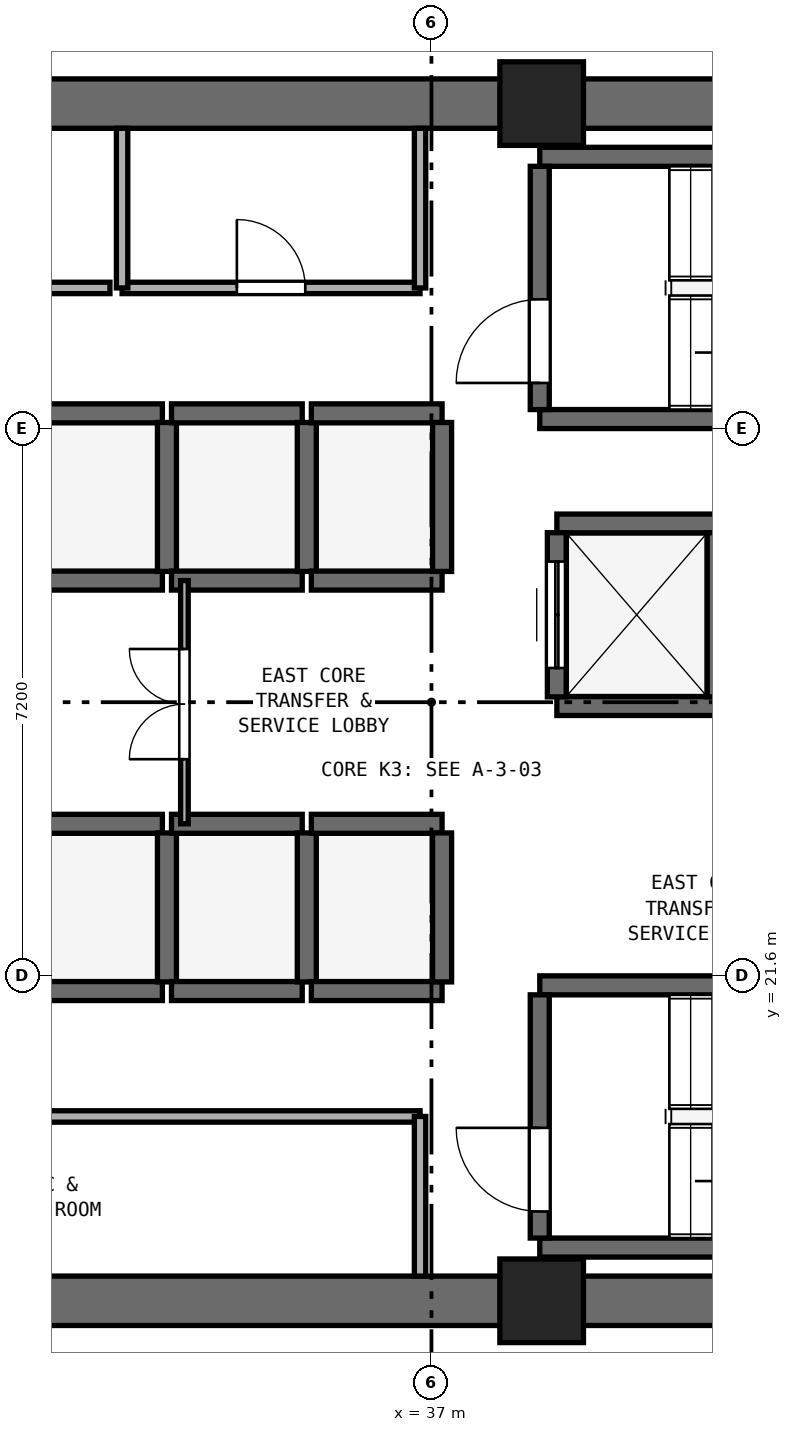
"""IFC4 building model, lengths in metres.
Left out: names, types, materials, properties, quantities, classifications, styles, units other than length and angle.
Written with IfcOpenShell. Run it as: python <this file> out.ifc"""

import sys

from ifc_helpers import new_model, si_unit, direction, frame, frame_2d, origin, origin_2d, place, context, subcontext, project, spatial, rectangle, extrude, element, fill, save


model = new_model("IFC4")
c1 = context("Model", 3, precision=1e-05, world=origin(), true_north=direction((0.0, 1.0)))
c2 = subcontext(c1, "Body", "Model", "MODEL_VIEW")
j1 = project(units=[si_unit("LENGTHUNIT", "METRE"), si_unit("PLANEANGLEUNIT", "RADIAN")], contexts=[c1])
p1 = place(None, origin())
s1 = spatial("IfcSite", under=j1, at=p1, CompositionType="ELEMENT")
p2 = place(p1, origin())
s2 = spatial("IfcBuilding", under=s1, at=p2, CompositionType="ELEMENT")
p3 = place(p2, frame((0.0, 0.0, 104.8)))
s3 = spatial("IfcBuildingStorey", under=s2, at=p3, CompositionType="ELEMENT", Elevation=104.8)
for number, where, z_axis, x_axis in (
    (1, (25.4, 17.325, 0.0), (0.0, 0.0, 1.0), (1.0, 0.0, 0.0)),
    (2, (25.4, 33.075, 0.0), (0.0, 0.0, 1.0), (1.0, 0.0, 0.0)),
):
    element("IfcWall", number, at=place(p3, frame(where, z_axis=z_axis, x_axis=x_axis)), inside=s3, PredefinedType="SHEAR", context=c2, shape_type="SweptSolid", body=[
        extrude(rectangle(XDim=23.2, YDim=0.65, at=frame_2d((11.6, 0.0))), origin(), (0.0, 0.0, 1.0), 3.525),
    ])
for number, where, z_axis, x_axis in (
    (3, (38.45, 17.325, 0.0), (0.0, 0.0, 1.0), (1.0, 0.0, 0.0)),
    (4, (38.45, 33.075, 0.0), (0.0, 0.0, 1.0), (1.0, 0.0, 0.0)),
):
    element("IfcColumn", number, at=place(p3, frame(where, z_axis=z_axis, x_axis=x_axis)), inside=s3, PredefinedType="PILASTER", context=c2, shape_type="SweptSolid", body=[
        extrude(rectangle(XDim=1.1, YDim=1.1, at=origin_2d()), origin(), (0.0, 0.0, 1.0), 3.8),
    ])
for number, where, z_axis, x_axis in (
    (5, (38.425, 28.925, 0.0), (0.0, 0.0, 1.0), (1.0, 0.0, 0.0)),
    (6, (38.425, 32.375, 0.0), (0.0, 0.0, 1.0), (1.0, 0.0, 0.0)),
):
    element("IfcWall", number, at=place(p3, frame(where, z_axis=z_axis, x_axis=x_axis)), inside=s3, PredefinedType="SHEAR", context=c2, shape_type="SweptSolid", body=[
        extrude(rectangle(XDim=7.3, YDim=0.25, at=frame_2d((3.65, 0.0))), origin(), (0.0, 0.0, 1.0), 3.525),
    ])
p4 = place(p3, frame((38.425, 29.05, 0.0), z_axis=(0.0, 0.0, 1.0), x_axis=(0.0, 1.0, 0.0)))
e7 = element("IfcWall", 7, at=p4, inside=s3, PredefinedType="SHEAR", context=c2, shape_type="SweptSolid", body=[
    extrude(rectangle(XDim=3.2, YDim=0.25, at=frame_2d((1.6, 0.0))), origin(), (0.0, 0.0, 1.0), 3.525),
])
p5 = place(p4, frame((0.35, 0.0, 0.0)))
e8 = element("IfcOpeningElement", 8, at=p5, cuts=e7, PredefinedType="OPENING", context=c2, shape_type="SweptSolid", body=[
    extrude(rectangle(XDim=1.1, YDim=2.15, at=frame_2d((0.55, 1.075))), frame((0.0, 0.135, 0.0), z_axis=(0.0, -1.0, 0.0), x_axis=(1.0, 0.0, 0.0)), (0.0, 0.0, 1.0), 0.27),
])
for number, where, z_axis, x_axis in (
    (9, (38.425, 18.025, 0.0), (0.0, 0.0, 1.0), (1.0, 0.0, 0.0)),
    (10, (38.425, 21.475, 0.0), (0.0, 0.0, 1.0), (1.0, 0.0, 0.0)),
):
    element("IfcWall", number, at=place(p3, frame(where, z_axis=z_axis, x_axis=x_axis)), inside=s3, PredefinedType="SHEAR", context=c2, shape_type="SweptSolid", body=[
        extrude(rectangle(XDim=7.3, YDim=0.25, at=frame_2d((3.65, 0.0))), origin(), (0.0, 0.0, 1.0), 3.525),
    ])
p6 = place(p3, frame((38.425, 18.15, 0.0), z_axis=(0.0, 0.0, 1.0), x_axis=(0.0, 1.0, 0.0)))
e11 = element("IfcWall", 11, at=p6, inside=s3, PredefinedType="SHEAR", context=c2, shape_type="SweptSolid", body=[
    extrude(rectangle(XDim=3.2, YDim=0.25, at=frame_2d((1.6, 0.0))), origin(), (0.0, 0.0, 1.0), 3.525),
])
p7 = place(p6, frame((0.35, 0.0, 0.0)))
e12 = element("IfcOpeningElement", 12, at=p7, cuts=e11, PredefinedType="OPENING", context=c2, shape_type="SweptSolid", body=[
    extrude(rectangle(XDim=1.1, YDim=2.15, at=frame_2d((0.55, 1.075))), frame((0.0, 0.135, 0.0), z_axis=(0.0, -1.0, 0.0), x_axis=(1.0, 0.0, 0.0)), (0.0, 0.0, 1.0), 0.27),
])
for number, where, z_axis, x_axis in (
    (13, (31.74, 21.4, 0.0), (0.0, 0.0, 1.0), (1.0, 0.0, 0.0)),
    (14, (31.74, 23.6, 0.0), (0.0, 0.0, 1.0), (1.0, 0.0, 0.0)),
):
    element("IfcWall", number, at=place(p3, frame(where, z_axis=z_axis, x_axis=x_axis)), inside=s3, PredefinedType="SHEAR", context=c2, shape_type="SweptSolid", body=[
        extrude(rectangle(XDim=1.72, YDim=0.25, at=frame_2d((0.86, 0.0))), origin(), (0.0, 0.0, 1.0), 3.525),
    ])
p8 = place(p3, frame((33.52, 21.52, 0.0), z_axis=(0.0, 0.0, 1.0), x_axis=(0.0, 1.0, 0.0)))
e15 = element("IfcWall", 15, at=p8, inside=s3, PredefinedType="SHEAR", context=c2, shape_type="SweptSolid", body=[
    extrude(rectangle(XDim=1.96, YDim=0.25, at=frame_2d((0.98, 0.0))), origin(), (0.0, 0.0, 1.0), 3.525),
])
for number, where, z_axis, x_axis in (
    (16, (33.58, 21.4, 0.0), (0.0, 0.0, 1.0), (1.0, 0.0, 0.0)),
    (17, (33.58, 23.6, 0.0), (0.0, 0.0, 1.0), (1.0, 0.0, 0.0)),
):
    element("IfcWall", number, at=place(p3, frame(where, z_axis=z_axis, x_axis=x_axis)), inside=s3, PredefinedType="SHEAR", context=c2, shape_type="SweptSolid", body=[
        extrude(rectangle(XDim=1.72, YDim=0.25, at=frame_2d((0.86, 0.0))), origin(), (0.0, 0.0, 1.0), 3.525),
    ])
p9 = place(p3, frame((35.36, 21.52, 0.0), z_axis=(0.0, 0.0, 1.0), x_axis=(0.0, 1.0, 0.0)))
e18 = element("IfcWall", 18, at=p9, inside=s3, PredefinedType="SHEAR", context=c2, shape_type="SweptSolid", body=[
    extrude(rectangle(XDim=1.96, YDim=0.25, at=frame_2d((0.98, 0.0))), origin(), (0.0, 0.0, 1.0), 3.525),
])
for number, where, z_axis, x_axis in (
    (19, (35.42, 21.4, 0.0), (0.0, 0.0, 1.0), (1.0, 0.0, 0.0)),
    (20, (35.42, 23.6, 0.0), (0.0, 0.0, 1.0), (1.0, 0.0, 0.0)),
):
    element("IfcWall", number, at=place(p3, frame(where, z_axis=z_axis, x_axis=x_axis)), inside=s3, PredefinedType="SHEAR", context=c2, shape_type="SweptSolid", body=[
        extrude(rectangle(XDim=1.72, YDim=0.25, at=frame_2d((0.86, 0.0))), origin(), (0.0, 0.0, 1.0), 3.525),
    ])
p10 = place(p3, frame((37.14, 21.52, 0.0), z_axis=(0.0, 0.0, 1.0), x_axis=(0.0, 1.0, 0.0)))
e21 = element("IfcWall", 21, at=p10, inside=s3, PredefinedType="SHEAR", context=c2, shape_type="SweptSolid", body=[
    extrude(rectangle(XDim=1.96, YDim=0.25, at=frame_2d((0.98, 0.0))), origin(), (0.0, 0.0, 1.0), 3.525),
])
for number, where, z_axis, x_axis in (
    (22, (31.74, 26.8, 0.0), (0.0, 0.0, 1.0), (1.0, 0.0, 0.0)),
    (23, (31.74, 29.0, 0.0), (0.0, 0.0, 1.0), (1.0, 0.0, 0.0)),
):
    element("IfcWall", number, at=place(p3, frame(where, z_axis=z_axis, x_axis=x_axis)), inside=s3, PredefinedType="SHEAR", context=c2, shape_type="SweptSolid", body=[
        extrude(rectangle(XDim=1.72, YDim=0.25, at=frame_2d((0.86, 0.0))), origin(), (0.0, 0.0, 1.0), 3.525),
    ])
p11 = place(p3, frame((33.52, 26.92, 0.0), z_axis=(0.0, 0.0, 1.0), x_axis=(0.0, 1.0, 0.0)))
e24 = element("IfcWall", 24, at=p11, inside=s3, PredefinedType="SHEAR", context=c2, shape_type="SweptSolid", body=[
    extrude(rectangle(XDim=1.96, YDim=0.25, at=frame_2d((0.98, 0.0))), origin(), (0.0, 0.0, 1.0), 3.525),
])
for number, where, z_axis, x_axis in (
    (25, (33.58, 26.8, 0.0), (0.0, 0.0, 1.0), (1.0, 0.0, 0.0)),
    (26, (33.58, 29.0, 0.0), (0.0, 0.0, 1.0), (1.0, 0.0, 0.0)),
):
    element("IfcWall", number, at=place(p3, frame(where, z_axis=z_axis, x_axis=x_axis)), inside=s3, PredefinedType="SHEAR", context=c2, shape_type="SweptSolid", body=[
        extrude(rectangle(XDim=1.72, YDim=0.25, at=frame_2d((0.86, 0.0))), origin(), (0.0, 0.0, 1.0), 3.525),
    ])
p12 = place(p3, frame((35.36, 26.92, 0.0), z_axis=(0.0, 0.0, 1.0), x_axis=(0.0, 1.0, 0.0)))
e27 = element("IfcWall", 27, at=p12, inside=s3, PredefinedType="SHEAR", context=c2, shape_type="SweptSolid", body=[
    extrude(rectangle(XDim=1.96, YDim=0.25, at=frame_2d((0.98, 0.0))), origin(), (0.0, 0.0, 1.0), 3.525),
])
for number, where, z_axis, x_axis in (
    (28, (35.42, 26.8, 0.0), (0.0, 0.0, 1.0), (1.0, 0.0, 0.0)),
    (29, (35.42, 29.0, 0.0), (0.0, 0.0, 1.0), (1.0, 0.0, 0.0)),
):
    element("IfcWall", number, at=place(p3, frame(where, z_axis=z_axis, x_axis=x_axis)), inside=s3, PredefinedType="SHEAR", context=c2, shape_type="SweptSolid", body=[
        extrude(rectangle(XDim=1.72, YDim=0.25, at=frame_2d((0.86, 0.0))), origin(), (0.0, 0.0, 1.0), 3.525),
    ])
p13 = place(p3, frame((37.14, 26.92, 0.0), z_axis=(0.0, 0.0, 1.0), x_axis=(0.0, 1.0, 0.0)))
e30 = element("IfcWall", 30, at=p13, inside=s3, PredefinedType="SHEAR", context=c2, shape_type="SweptSolid", body=[
    extrude(rectangle(XDim=1.96, YDim=0.25, at=frame_2d((0.98, 0.0))), origin(), (0.0, 0.0, 1.0), 3.525),
])
for number, where, z_axis, x_axis in (
    (31, (38.65, 25.15, 0.0), (0.0, 0.0, 1.0), (1.0, 0.0, 0.0)),
    (32, (38.65, 27.55, 0.0), (0.0, 0.0, 1.0), (1.0, 0.0, 0.0)),
):
    element("IfcWall", number, at=place(p3, frame(where, z_axis=z_axis, x_axis=x_axis)), inside=s3, PredefinedType="SHEAR", context=c2, shape_type="SweptSolid", body=[
        extrude(rectangle(XDim=2.1, YDim=0.25, at=frame_2d((1.05, 0.0))), origin(), (0.0, 0.0, 1.0), 3.525),
    ])
p14 = place(p3, frame((38.65, 25.27, 0.0), z_axis=(0.0, 0.0, 1.0), x_axis=(0.0, 1.0, 0.0)))
e33 = element("IfcWall", 33, at=p14, inside=s3, PredefinedType="SHEAR", context=c2, shape_type="SweptSolid", body=[
    extrude(rectangle(XDim=2.16, YDim=0.25, at=frame_2d((1.08, 0.0))), origin(), (0.0, 0.0, 1.0), 3.525),
])
p15 = place(p14, frame((0.38, 0.0, 0.0)))
e34 = element("IfcOpeningElement", 34, at=p15, cuts=e33, PredefinedType="OPENING", context=c2, shape_type="SweptSolid", body=[
    extrude(rectangle(XDim=1.4, YDim=2.2, at=frame_2d((0.7, 1.1))), frame((0.0, 0.135, 0.0), z_axis=(0.0, -1.0, 0.0), x_axis=(1.0, 0.0, 0.0)), (0.0, 0.0, 1.0), 0.27),
])
p16 = place(p3, frame((40.75, 25.27, 0.0), z_axis=(0.0, 0.0, 1.0), x_axis=(0.0, 1.0, 0.0)))
e35 = element("IfcWall", 35, at=p16, inside=s3, PredefinedType="SHEAR", context=c2, shape_type="SweptSolid", body=[
    extrude(rectangle(XDim=2.16, YDim=0.25, at=frame_2d((1.08, 0.0))), origin(), (0.0, 0.0, 1.0), 3.525),
])
p17 = place(p3, frame((29.53, 30.65, 0.0), z_axis=(0.0, 0.0, 1.0), x_axis=(1.0, 0.0, 0.0)))
e36 = element("IfcWall", 36, at=p17, inside=s3, PredefinedType="PARTITIONING", context=c2, shape_type="SweptSolid", body=[
    extrude(rectangle(XDim=3.24, YDim=0.15, at=frame_2d((1.62, 0.0))), origin(), (0.0, 0.0, 1.0), 3.525),
])
p18 = place(p17, frame((1.145, 0.0, 0.0)))
e37 = element("IfcOpeningElement", 37, at=p18, cuts=e36, PredefinedType="OPENING", context=c2, shape_type="SweptSolid", body=[
    extrude(rectangle(XDim=0.95, YDim=2.1, at=frame_2d((0.475, 1.05))), frame((0.0, 0.085, 0.0), z_axis=(0.0, -1.0, 0.0), x_axis=(1.0, 0.0, 0.0)), (0.0, 0.0, 1.0), 0.17),
])
p19 = place(p3, frame((32.93, 30.65, 0.0), z_axis=(0.0, 0.0, 1.0), x_axis=(1.0, 0.0, 0.0)))
e38 = element("IfcWall", 38, at=p19, inside=s3, PredefinedType="PARTITIONING", context=c2, shape_type="SweptSolid", body=[
    extrude(rectangle(XDim=3.92, YDim=0.15, at=frame_2d((1.96, 0.0))), origin(), (0.0, 0.0, 1.0), 3.525),
])
p20 = place(p19, frame((1.51, 0.0, 0.0)))
e39 = element("IfcOpeningElement", 39, at=p20, cuts=e38, PredefinedType="OPENING", context=c2, shape_type="SweptSolid", body=[
    extrude(rectangle(XDim=0.9, YDim=2.1, at=frame_2d((0.45, 1.05))), frame((0.0, 0.085, 0.0), z_axis=(0.0, -1.0, 0.0), x_axis=(1.0, 0.0, 0.0)), (0.0, 0.0, 1.0), 0.17),
])
for number, where, z_axis, x_axis in (
    (40, (32.93, 30.65, 0.0), (0.0, 0.0, 1.0), (0.0, 1.0, 0.0)),
    (41, (36.85, 30.65, 0.0), (0.0, 0.0, 1.0), (0.0, 1.0, 0.0)),
):
    element("IfcWall", number, at=place(p3, frame(where, z_axis=z_axis, x_axis=x_axis)), inside=s3, PredefinedType="PARTITIONING", context=c2, shape_type="SweptSolid", body=[
        extrude(rectangle(XDim=2.1, YDim=0.15, at=frame_2d((1.05, 0.0))), origin(), (0.0, 0.0, 1.0), 3.525),
    ])
p21 = place(p3, frame((26.17, 19.75, 0.0), z_axis=(0.0, 0.0, 1.0), x_axis=(1.0, 0.0, 0.0)))
e42 = element("IfcWall", 42, at=p21, inside=s3, PredefinedType="PARTITIONING", context=c2, shape_type="SweptSolid", body=[
    extrude(rectangle(XDim=10.68, YDim=0.15, at=frame_2d((5.34, 0.0))), origin(), (0.0, 0.0, 1.0), 3.525),
])
p22 = place(p21, frame((4.865, 0.0, 0.0)))
e43 = element("IfcOpeningElement", 43, at=p22, cuts=e42, PredefinedType="OPENING", context=c2, shape_type="SweptSolid", body=[
    extrude(rectangle(XDim=0.95, YDim=2.1, at=frame_2d((0.475, 1.05))), frame((0.0, 0.085, 0.0), z_axis=(0.0, -1.0, 0.0), x_axis=(1.0, 0.0, 0.0)), (0.0, 0.0, 1.0), 0.17),
])
p23 = place(p3, frame((36.85, 17.65, 0.0), z_axis=(0.0, 0.0, 1.0), x_axis=(0.0, 1.0, 0.0)))
e44 = element("IfcWall", 44, at=p23, inside=s3, PredefinedType="PARTITIONING", context=c2, shape_type="SweptSolid", body=[
    extrude(rectangle(XDim=2.1, YDim=0.15, at=frame_2d((1.05, 0.0))), origin(), (0.0, 0.0, 1.0), 3.525),
])
p24 = place(p3, frame((33.75, 23.6, 0.0), z_axis=(0.0, 0.0, 1.0), x_axis=(0.0, 1.0, 0.0)))
e45 = element("IfcWall", 45, at=p24, inside=s3, PredefinedType="PARTITIONING", context=c2, shape_type="SweptSolid", body=[
    extrude(rectangle(XDim=3.2, YDim=0.1, at=frame_2d((1.6, 0.0))), origin(), (0.0, 0.0, 1.0), 3.525),
])
p25 = place(p24, frame((0.85, 0.0, 0.0)))
e46 = element("IfcOpeningElement", 46, at=p25, cuts=e45, PredefinedType="OPENING", context=c2, shape_type="SweptSolid", body=[
    extrude(rectangle(XDim=1.45, YDim=2.12, at=frame_2d((0.725, 1.06))), frame((0.0, 0.06, 0.0), z_axis=(0.0, -1.0, 0.0), x_axis=(1.0, 0.0, 0.0)), (0.0, 0.0, 1.0), 0.12),
])
p26 = place(p5, origin())
e47 = element("IfcDoor", 47, at=p26, inside=s3, OperationType="SINGLE_SWING_LEFT", PredefinedType="DOOR", context=c2, shape_type="SweptSolid", body=[
    extrude(rectangle(XDim=1.1, YDim=2.15, at=frame_2d((0.55, 1.075))), frame((0.0, 0.025, 0.0), z_axis=(0.0, -1.0, 0.0), x_axis=(1.0, 0.0, 0.0)), (0.0, 0.0, 1.0), 0.05),
])
fill(e8, e47)
p27 = place(p7, origin())
e48 = element("IfcDoor", 48, at=p27, inside=s3, OperationType="SINGLE_SWING_RIGHT", PredefinedType="DOOR", context=c2, shape_type="SweptSolid", body=[
    extrude(rectangle(XDim=1.1, YDim=2.15, at=frame_2d((0.55, 1.075))), frame((0.0, 0.025, 0.0), z_axis=(0.0, -1.0, 0.0), x_axis=(1.0, 0.0, 0.0)), (0.0, 0.0, 1.0), 0.05),
])
fill(e12, e48)
p28 = place(p15, origin())
e49 = element("IfcDoor", 49, at=p28, inside=s3, OperationType="DOUBLE_DOOR_SLIDING", PredefinedType="DOOR", context=c2, shape_type="SweptSolid", body=[
    extrude(rectangle(XDim=1.4, YDim=2.2, at=frame_2d((0.7, 1.1))), frame((0.0, 0.025, 0.0), z_axis=(0.0, -1.0, 0.0), x_axis=(1.0, 0.0, 0.0)), (0.0, 0.0, 1.0), 0.05),
])
fill(e34, e49)
p29 = place(p20, origin())
e50 = element("IfcDoor", 50, at=p29, inside=s3, OperationType="SINGLE_SWING_LEFT", PredefinedType="DOOR", context=c2, shape_type="SweptSolid", body=[
    extrude(rectangle(XDim=0.9, YDim=2.1, at=frame_2d((0.45, 1.05))), frame((0.0, 0.025, 0.0), z_axis=(0.0, -1.0, 0.0), x_axis=(1.0, 0.0, 0.0)), (0.0, 0.0, 1.0), 0.05),
])
fill(e39, e50)
p30 = place(p25, origin())
e51 = element("IfcDoor", 51, at=p30, inside=s3, OperationType="DOUBLE_DOOR_SINGLE_SWING", PredefinedType="DOOR", context=c2, shape_type="SweptSolid", body=[
    extrude(rectangle(XDim=1.45, YDim=2.12, at=frame_2d((0.725, 1.06))), frame((0.0, 0.025, 0.0), z_axis=(0.0, -1.0, 0.0), x_axis=(1.0, 0.0, 0.0)), (0.0, 0.0, 1.0), 0.05),
])
fill(e46, e51)
save(model, sys.argv[1])
